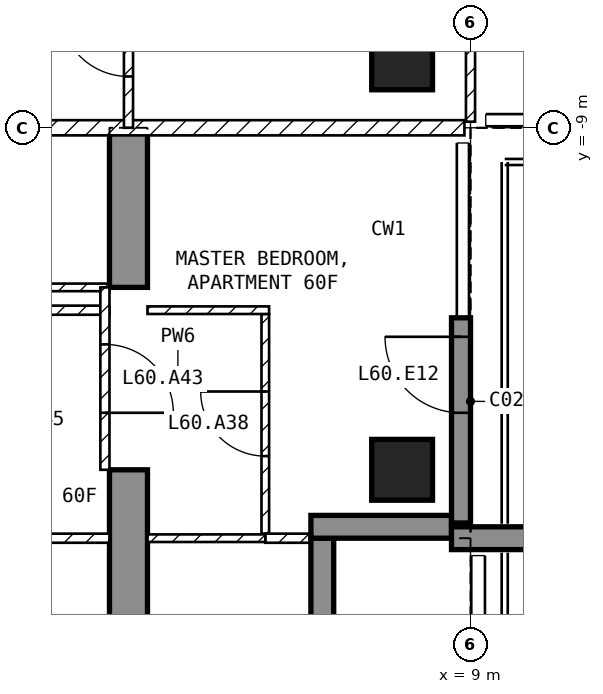
"""IFC4 building model, lengths in metres.
Left out: names, types, materials, properties, quantities, classifications, styles, units other than length and angle.
Written with IfcOpenShell. Run it as: python <this file> out.ifc"""

import sys

from ifc_helpers import new_model, si_unit, direction, frame, frame_2d, origin, origin_2d, place, context, subcontext, project, spatial, polyline, rectangle, outline, extrude, element, fill, save


model = new_model("IFC4")
c1 = context("Model", 3, precision=1e-05, world=origin(), true_north=direction((0.0, 1.0)))
c2 = subcontext(c1, "Body", "Model", "MODEL_VIEW")
j1 = project(units=[si_unit("LENGTHUNIT", "METRE"), si_unit("PLANEANGLEUNIT", "RADIAN")], contexts=[c1])
p1 = place(None, origin())
s1 = spatial("IfcSite", under=j1, at=p1, CompositionType="ELEMENT")
p2 = place(p1, origin())
s2 = spatial("IfcBuilding", under=s1, at=p2, CompositionType="ELEMENT")
p3 = place(p2, frame((0.0, 0.0, 239.5)))
s3 = spatial("IfcBuildingStorey", under=s2, at=p3, CompositionType="ELEMENT", Elevation=239.5)
for number, where, z_axis, x_axis in (
    (1, (8.1, -13.5, -0.25), (0.0, 0.0, 1.0), (1.0, 0.0, 0.0)),
    (2, (8.1, -8.1, -0.25), (0.0, 0.0, 1.0), (1.0, 0.0, 0.0)),
):
    element("IfcColumn", number, at=place(p3, frame(where, z_axis=z_axis, x_axis=x_axis)), inside=s3, PredefinedType="COLUMN", context=c2, shape_type="SweptSolid", body=[
        extrude(rectangle(XDim=0.8, YDim=0.8, at=origin_2d()), origin(), (0.0, 0.0, 1.0), 3.5),
    ])
p4 = place(p3, frame((4.25, -16.7, -0.25), z_axis=(1.0, 0.0, 0.0), x_axis=(0.0, 1.0, 0.0)))
e3 = element("IfcWall", 3, at=p4, inside=s3, PredefinedType="SHEAR", context=c2, shape_type="SweptSolid", body=[
    extrude(outline(polyline([(0.0, 0.0), (3.2, 0.0), (3.2, 2.65), (5.6, 2.65), (5.6, 0.0), (7.7, 0.0), (7.7, 3.5), (0.0, 3.5), (0.0, 0.0)])), origin(), (0.0, 0.0, 1.0), 0.5),
])
p5 = place(p3, frame((8.875, -14.2, 0.0), z_axis=(0.0, 0.0, 1.0), x_axis=(0.0, 1.0, 0.0)))
e4 = element("IfcWall", 4, at=p5, inside=s3, PredefinedType="SOLIDWALL", context=c2, shape_type="SweptSolid", body=[
    extrude(rectangle(XDim=2.7, YDim=0.25, at=frame_2d((1.35, 0.0))), origin(), (0.0, 0.0, 1.0), 3.25),
])
p6 = place(p5, frame((1.45, 0.0, 0.0)))
e5 = element("IfcOpeningElement", 5, at=p6, cuts=e4, PredefinedType="OPENING", context=c2, shape_type="SweptSolid", body=[
    extrude(rectangle(XDim=1.0, YDim=2.4, at=frame_2d((0.5, 1.2))), frame((0.0, 0.135, 0.0), z_axis=(0.0, -1.0, 0.0), x_axis=(1.0, 0.0, 0.0)), (0.0, 0.0, 1.0), 0.27),
])
p7 = place(p3, frame((7.05, -16.2, 0.0), z_axis=(0.0, 0.0, 1.0), x_axis=(0.0, 1.0, 0.0)))
e6 = element("IfcWall", 6, at=p7, inside=s3, PredefinedType="SOLIDWALL", context=c2, shape_type="SweptSolid", body=[
    extrude(rectangle(XDim=1.8, YDim=0.3, at=frame_2d((0.9, 0.0))), origin(), (0.0, 0.0, 1.0), 3.25),
])
p8 = place(p3, frame((6.9, -14.25, 0.0), z_axis=(0.0, 0.0, 1.0), x_axis=(1.0, 0.0, 0.0)))
e7 = element("IfcWall", 7, at=p8, inside=s3, PredefinedType="SOLIDWALL", context=c2, shape_type="SweptSolid", body=[
    extrude(rectangle(XDim=1.85, YDim=0.3, at=frame_2d((0.925, 0.0))), origin(), (0.0, 0.0, 1.0), 3.25),
])
p9 = place(p3, frame((8.75, -14.4, 0.0), z_axis=(0.0, 0.0, 1.0), x_axis=(1.0, 0.0, 0.0)))
e8 = element("IfcWall", 8, at=p9, inside=s3, PredefinedType="SOLIDWALL", context=c2, shape_type="SweptSolid", body=[
    extrude(rectangle(XDim=2.95, YDim=0.3, at=frame_2d((1.475, 0.0))), origin(), (0.0, 0.0, 1.0), 3.25),
])
p10 = place(p3, frame((8.92, -9.0, 0.0), z_axis=(0.0, 0.0, 1.0), x_axis=(-1.0, 0.0, 0.0)))
e9 = element("IfcWall", 9, at=p10, inside=s3, PredefinedType="PARTITIONING", context=c2, shape_type="SweptSolid", body=[
    extrude(rectangle(XDim=17.84, YDim=0.2, at=frame_2d((8.92, 0.0))), origin(), (0.0, 0.0, 1.0), 3.25),
])
p11 = place(p10, frame((8.42, 0.0, 0.0)))
e10 = element("IfcOpeningElement", 10, at=p11, cuts=e9, PredefinedType="OPENING", context=c2, shape_type="SweptSolid", body=[
    extrude(rectangle(XDim=1.0, YDim=2.1, at=frame_2d((0.5, 1.05))), frame((0.0, 0.11, 0.0), z_axis=(0.0, -1.0, 0.0), x_axis=(1.0, 0.0, 0.0)), (0.0, 0.0, 1.0), 0.22),
])
p12 = place(p3, frame((9.0, -8.92, 0.0), z_axis=(0.0, 0.0, 1.0), x_axis=(0.0, 1.0, 0.0)))
e11 = element("IfcWall", 11, at=p12, inside=s3, PredefinedType="PARTITIONING", context=c2, shape_type="SweptSolid", body=[
    extrude(rectangle(XDim=7.62, YDim=0.12, at=frame_2d((3.81, 0.0))), origin(), (0.0, 0.0, 1.0), 3.25),
])
p13 = place(p12, frame((6.32, 0.0, 0.0)))
e12 = element("IfcOpeningElement", 12, at=p13, cuts=e11, PredefinedType="OPENING", context=c2, shape_type="SweptSolid", body=[
    extrude(rectangle(XDim=0.9, YDim=2.1, at=frame_2d((0.45, 1.05))), frame((0.0, 0.07, 0.0), z_axis=(0.0, -1.0, 0.0), x_axis=(1.0, 0.0, 0.0)), (0.0, 0.0, 1.0), 0.14),
])
p14 = place(p3, frame((4.5, -9.0, 0.0), z_axis=(0.0, 0.0, 1.0), x_axis=(0.0, 1.0, 0.0)))
e13 = element("IfcWall", 13, at=p14, inside=s3, PredefinedType="PARTITIONING", context=c2, shape_type="SweptSolid", body=[
    extrude(rectangle(XDim=2.25, YDim=0.12, at=frame_2d((1.125, 0.0))), origin(), (0.0, 0.0, 1.0), 3.25),
])
p15 = place(p14, frame((0.675, 0.0, 0.0)))
e14 = element("IfcOpeningElement", 14, at=p15, cuts=e13, PredefinedType="OPENING", context=c2, shape_type="SweptSolid", body=[
    extrude(rectangle(XDim=0.9, YDim=2.1, at=frame_2d((0.45, 1.05))), frame((0.0, 0.07, 0.0), z_axis=(0.0, -1.0, 0.0), x_axis=(1.0, 0.0, 0.0)), (0.0, 0.0, 1.0), 0.14),
])
p16 = place(p3, frame((4.25, -11.1, 0.0), z_axis=(0.0, 0.0, 1.0), x_axis=(-1.0, 0.0, 0.0)))
e15 = element("IfcWall", 15, at=p16, inside=s3, PredefinedType="PARTITIONING", context=c2, shape_type="SweptSolid", body=[
    extrude(rectangle(XDim=2.15, YDim=0.1, at=frame_2d((1.075, 0.0))), origin(), (0.0, 0.0, 1.0), 3.25),
])
p17 = place(p3, frame((4.25, -11.4, 0.0), z_axis=(0.0, 0.0, 1.0), x_axis=(-1.0, 0.0, 0.0)))
e16 = element("IfcWall", 16, at=p17, inside=s3, PredefinedType="PARTITIONING", context=c2, shape_type="SweptSolid", body=[
    extrude(rectangle(XDim=3.81, YDim=0.12, at=frame_2d((1.905, 0.0))), origin(), (0.0, 0.0, 1.0), 3.25),
])
p18 = place(p3, frame((4.25, -14.4, 0.0), z_axis=(0.0, 0.0, 1.0), x_axis=(-1.0, 0.0, 0.0)))
e17 = element("IfcWall", 17, at=p18, inside=s3, PredefinedType="PARTITIONING", context=c2, shape_type="SweptSolid", body=[
    extrude(rectangle(XDim=8.5, YDim=0.12, at=frame_2d((4.25, 0.0))), origin(), (0.0, 0.0, 1.0), 3.25),
])
p19 = place(p18, frame((5.675, 0.0, 0.0)))
e18 = element("IfcOpeningElement", 18, at=p19, cuts=e17, PredefinedType="OPENING", context=c2, shape_type="SweptSolid", body=[
    extrude(rectangle(XDim=0.9, YDim=2.1, at=frame_2d((0.45, 1.05))), frame((0.0, 0.07, 0.0), z_axis=(0.0, -1.0, 0.0), x_axis=(1.0, 0.0, 0.0)), (0.0, 0.0, 1.0), 0.14),
])
p20 = place(p3, frame((6.3, -14.34, 0.0), z_axis=(0.0, 0.0, 1.0), x_axis=(0.0, 1.0, 0.0)))
e19 = element("IfcWall", 19, at=p20, inside=s3, PredefinedType="PARTITIONING", context=c2, shape_type="SweptSolid", body=[
    extrude(rectangle(XDim=2.89, YDim=0.1, at=frame_2d((1.445, 0.0))), origin(), (0.0, 0.0, 1.0), 3.25),
])
p21 = place(p20, frame((1.02, 0.0, 0.0)))
e20 = element("IfcOpeningElement", 20, at=p21, cuts=e19, PredefinedType="OPENING", context=c2, shape_type="SweptSolid", body=[
    extrude(rectangle(XDim=0.85, YDim=2.1, at=frame_2d((0.425, 1.05))), frame((0.0, 0.06, 0.0), z_axis=(0.0, -1.0, 0.0), x_axis=(1.0, 0.0, 0.0)), (0.0, 0.0, 1.0), 0.12),
])
p22 = place(p3, frame((6.35, -11.4, 0.0), z_axis=(0.0, 0.0, 1.0), x_axis=(-1.0, 0.0, 0.0)))
e21 = element("IfcWall", 21, at=p22, inside=s3, PredefinedType="PARTITIONING", context=c2, shape_type="SweptSolid", body=[
    extrude(rectangle(XDim=1.6, YDim=0.1, at=frame_2d((0.8, 0.0))), origin(), (0.0, 0.0, 1.0), 3.25),
])
p23 = place(p3, frame((7.12, -14.4, 0.0), z_axis=(0.0, 0.0, 1.0), x_axis=(-1.0, 0.0, 0.0)))
e22 = element("IfcWall", 22, at=p23, inside=s3, PredefinedType="PARTITIONING", context=c2, shape_type="SweptSolid", body=[
    extrude(rectangle(XDim=0.82, YDim=0.12, at=frame_2d((0.41, 0.0))), origin(), (0.0, 0.0, 1.0), 3.25),
])
p24 = place(p3, frame((6.3, -14.4, 0.0), z_axis=(0.0, 0.0, 1.0), x_axis=(-1.0, 0.0, 0.0)))
e23 = element("IfcWall", 23, at=p24, inside=s3, PredefinedType="PARTITIONING", context=c2, shape_type="SweptSolid", body=[
    extrude(rectangle(XDim=1.55, YDim=0.1, at=frame_2d((0.775, 0.0))), origin(), (0.0, 0.0, 1.0), 3.25),
])
p25 = place(p3, frame((4.19, -11.1, 0.0), z_axis=(0.0, 0.0, 1.0), x_axis=(0.0, -1.0, 0.0)))
e24 = element("IfcWall", 24, at=p25, inside=s3, PredefinedType="PARTITIONING", context=c2, shape_type="SweptSolid", body=[
    extrude(rectangle(XDim=2.4, YDim=0.12, at=frame_2d((1.2, 0.0))), origin(), (0.0, 0.0, 1.0), 2.4),
])
p26 = place(p25, frame((0.75, 0.0, 0.0)))
e25 = element("IfcOpeningElement", 25, at=p26, cuts=e24, PredefinedType="OPENING", context=c2, shape_type="SweptSolid", body=[
    extrude(rectangle(XDim=0.9, YDim=2.1, at=frame_2d((0.45, 1.05))), frame((0.0, 0.07, 0.0), z_axis=(0.0, -1.0, 0.0), x_axis=(1.0, 0.0, 0.0)), (0.0, 0.0, 1.0), 0.14),
])
p27 = place(p6, origin())
e26 = element("IfcDoor", 26, at=p27, inside=s3, OperationType="SINGLE_SWING_RIGHT", PredefinedType="DOOR", context=c2, shape_type="SweptSolid", body=[
    extrude(rectangle(XDim=1.0, YDim=2.4, at=frame_2d((0.5, 1.2))), frame((0.0, 0.025, 0.0), z_axis=(0.0, -1.0, 0.0), x_axis=(1.0, 0.0, 0.0)), (0.0, 0.0, 1.0), 0.05),
])
fill(e5, e26)
p28 = place(p15, origin())
e27 = element("IfcDoor", 27, at=p28, inside=s3, OperationType="SINGLE_SWING_RIGHT", PredefinedType="DOOR", context=c2, shape_type="SweptSolid", body=[
    extrude(rectangle(XDim=0.9, YDim=2.1, at=frame_2d((0.45, 1.05))), frame((0.0, 0.025, 0.0), z_axis=(0.0, -1.0, 0.0), x_axis=(1.0, 0.0, 0.0)), (0.0, 0.0, 1.0), 0.05),
])
fill(e14, e27)
p29 = place(p21, origin())
e28 = element("IfcDoor", 28, at=p29, inside=s3, OperationType="SINGLE_SWING_RIGHT", PredefinedType="DOOR", context=c2, shape_type="SweptSolid", body=[
    extrude(rectangle(XDim=0.85, YDim=2.1, at=frame_2d((0.425, 1.05))), frame((0.0, 0.025, 0.0), z_axis=(0.0, -1.0, 0.0), x_axis=(1.0, 0.0, 0.0)), (0.0, 0.0, 1.0), 0.05),
])
fill(e20, e28)
p30 = place(p26, origin())
e29 = element("IfcDoor", 29, at=p30, inside=s3, OperationType="SINGLE_SWING_RIGHT", PredefinedType="DOOR", context=c2, shape_type="SweptSolid", body=[
    extrude(rectangle(XDim=0.9, YDim=2.1, at=frame_2d((0.45, 1.05))), frame((0.0, 0.025, 0.0), z_axis=(0.0, -1.0, 0.0), x_axis=(1.0, 0.0, 0.0)), (0.0, 0.0, 1.0), 0.05),
])
fill(e25, e29)
save(model, sys.argv[1])
